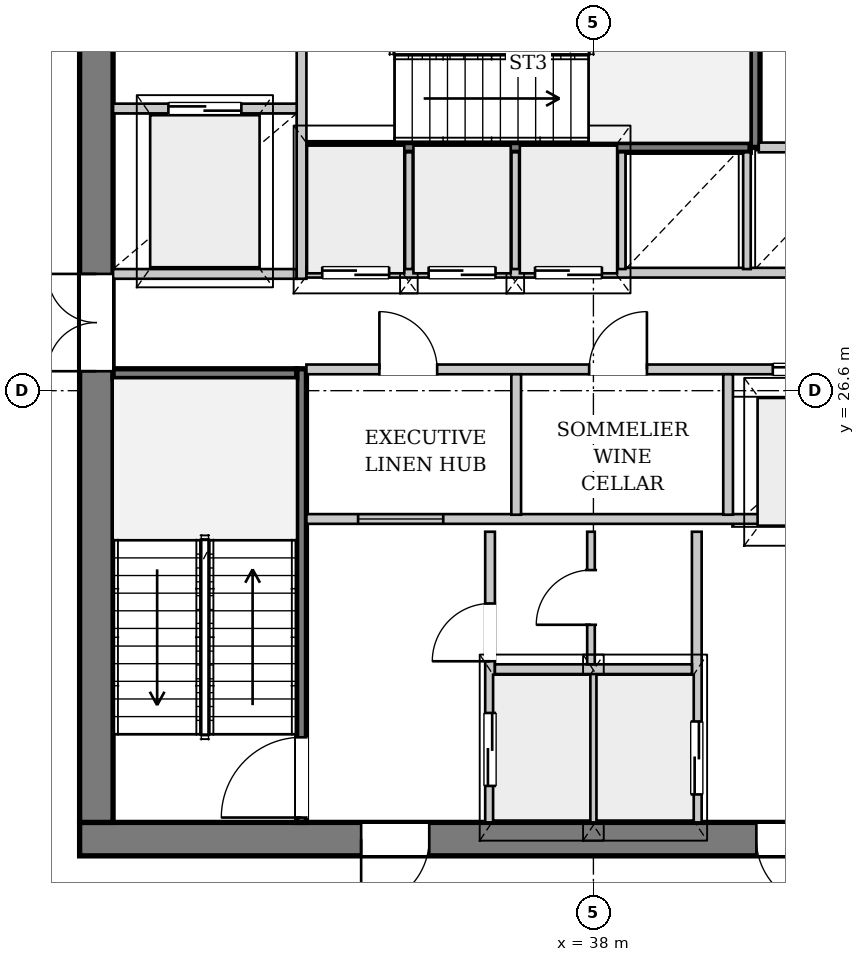
"""IFC4 building model, lengths in metres.
Left out: names, types, materials, properties, quantities, classifications, styles, units other than length and angle.
Written with IfcOpenShell. Run it as: python <this file> out.ifc"""

import sys

from ifc_helpers import new_model, si_unit, direction, frame, frame_2d, origin, place, context, subcontext, project, spatial, rectangle, extrude, source, transform, mapped, element, fill, save


model = new_model("IFC4")
c1 = context("Model", 3, precision=1e-05, world=origin(), true_north=direction((0.0, 1.0)))
c2 = subcontext(c1, "Body", "Model", "MODEL_VIEW")
j1 = project(units=[si_unit("LENGTHUNIT", "METRE"), si_unit("PLANEANGLEUNIT", "RADIAN")], contexts=[c1])
p1 = place(None, origin())
s1 = spatial("IfcSite", under=j1, at=p1, CompositionType="ELEMENT")
p2 = place(p1, origin())
s2 = spatial("IfcBuilding", under=s1, at=p2, CompositionType="ELEMENT")
p3 = place(p2, frame((0.0, 0.0, 200.3)))
s3 = spatial("IfcBuildingStorey", under=s2, at=p3, CompositionType="ELEMENT", Elevation=200.3)
p4 = place(p3, frame((46.45, 19.225, 0.0), z_axis=(0.0, 0.0, 1.0), x_axis=(-1.0, 0.0, 0.0)))
e1 = element("IfcWall", 1, at=p4, inside=s3, PredefinedType="SHEAR", context=c2, shape_type="SweptSolid", body=[
    extrude(rectangle(XDim=16.9, YDim=0.55, at=frame_2d((8.45, 0.0))), origin(), (0.0, 0.0, 1.0), 3.58),
])
p5 = place(p4, frame((4.65, 0.0, 0.0)))
e2 = element("IfcOpeningElement", 2, at=p5, cuts=e1, PredefinedType="OPENING", context=c2, shape_type="SweptSolid", body=[
    extrude(rectangle(XDim=1.12, YDim=2.25, at=frame_2d((0.56, 1.125))), frame((0.0, 0.285, 0.0), z_axis=(0.0, -1.0, 0.0), x_axis=(1.0, 0.0, 0.0)), (0.0, 0.0, 1.0), 0.57),
])
p6 = place(p4, frame((11.15, 0.0, 0.0)))
e3 = element("IfcOpeningElement", 3, at=p6, cuts=e1, PredefinedType="OPENING", context=c2, shape_type="SweptSolid", body=[
    extrude(rectangle(XDim=1.12, YDim=2.25, at=frame_2d((0.56, 1.125))), frame((0.0, 0.285, 0.0), z_axis=(0.0, -1.0, 0.0), x_axis=(1.0, 0.0, 0.0)), (0.0, 0.0, 1.0), 0.57),
])
p7 = place(p3, frame((29.825, 19.5, 0.0), z_axis=(0.0, 0.0, 1.0), x_axis=(0.0, 1.0, 0.0)))
e4 = element("IfcWall", 4, at=p7, inside=s3, PredefinedType="SHEAR", context=c2, shape_type="SweptSolid", body=[
    extrude(rectangle(XDim=14.2, YDim=0.55, at=frame_2d((7.1, 0.0))), origin(), (0.0, 0.0, 1.0), 3.58),
])
p8 = place(p7, frame((7.42, 0.0, 0.0)))
e5 = element("IfcOpeningElement", 5, at=p8, cuts=e4, PredefinedType="OPENING", context=c2, shape_type="SweptSolid", body=[
    extrude(rectangle(XDim=1.6, YDim=2.2, at=frame_2d((0.8, 1.1))), frame((0.0, 0.285, 0.0), z_axis=(0.0, -1.0, 0.0), x_axis=(1.0, 0.0, 0.0)), (0.0, 0.0, 1.0), 0.57),
])
p9 = place(p3, frame((33.2, 19.5, 0.0), z_axis=(0.0, 0.0, 1.0), x_axis=(0.0, 1.0, 0.0)))
e6 = element("IfcWall", 6, at=p9, inside=s3, PredefinedType="PARTITIONING", context=c2, shape_type="SweptSolid", body=[
    extrude(rectangle(XDim=7.46, YDim=0.16, at=frame_2d((3.73, 0.0))), origin(), (0.0, 0.0, 1.0), 3.58),
])
p10 = place(p9, frame((0.08, 0.0, 0.0)))
e7 = element("IfcOpeningElement", 7, at=p10, cuts=e6, PredefinedType="OPENING", context=c2, shape_type="SweptSolid", body=[
    extrude(rectangle(XDim=1.32, YDim=2.2, at=frame_2d((0.66, 1.1))), frame((0.0, 0.09, 0.0), z_axis=(0.0, -1.0, 0.0), x_axis=(1.0, 0.0, 0.0)), (0.0, 0.0, 1.0), 0.18),
])
p11 = place(p3, frame((30.1, 26.88, 0.0), z_axis=(0.0, 0.0, 1.0), x_axis=(1.0, 0.0, 0.0)))
e8 = element("IfcWall", 8, at=p11, inside=s3, PredefinedType="PARTITIONING", context=c2, shape_type="SweptSolid", body=[
    extrude(rectangle(XDim=3.02, YDim=0.16, at=frame_2d((1.51, 0.0))), origin(), (0.0, 0.0, 1.0), 3.58),
])
p12 = place(p3, frame((33.28, 30.6, 0.0), z_axis=(0.0, 0.0, 1.0), x_axis=(1.0, 0.0, 0.0)))
e9 = element("IfcWall", 9, at=p12, inside=s3, PredefinedType="PARTITIONING", context=c2, shape_type="SweptSolid", body=[
    extrude(rectangle(XDim=7.3, YDim=0.16, at=frame_2d((3.65, 0.0))), origin(), (0.0, 0.0, 1.0), 3.58),
])
p13 = place(p3, frame((40.66, 30.6, 0.0), z_axis=(0.0, 0.0, 1.0), x_axis=(0.0, 1.0, 0.0)))
e10 = element("IfcWall", 10, at=p13, inside=s3, PredefinedType="PARTITIONING", context=c2, shape_type="SweptSolid", body=[
    extrude(rectangle(XDim=3.1, YDim=0.16, at=frame_2d((1.55, 0.0))), origin(), (0.0, 0.0, 1.0), 3.58),
])
p14 = place(p3, frame((36.3, 19.5, 0.0), z_axis=(0.0, 0.0, 1.0), x_axis=(0.0, 1.0, 0.0)))
e11 = element("IfcWall", 11, at=p14, inside=s3, PredefinedType="PARTITIONING", context=c2, shape_type="SweptSolid", body=[
    extrude(rectangle(XDim=4.78, YDim=0.16, at=frame_2d((2.39, 0.0))), origin(), (0.0, 0.0, 1.0), 3.58),
])
p15 = place(p14, frame((0.6, 0.0, 0.0)))
e12 = element("IfcOpeningElement", 12, at=p15, cuts=e11, PredefinedType="OPENING", context=c2, shape_type="SweptSolid", body=[
    extrude(rectangle(XDim=1.2, YDim=2.2, at=frame_2d((0.6, 1.1))), frame((0.0, 0.09, 0.0), z_axis=(0.0, -1.0, 0.0), x_axis=(1.0, 0.0, 0.0)), (0.0, 0.0, 1.0), 0.18),
])
p16 = place(p14, frame((2.65, 0.0, 0.0)))
e13 = element("IfcOpeningElement", 13, at=p16, cuts=e11, PredefinedType="OPENING", context=c2, shape_type="SweptSolid", body=[
    extrude(rectangle(XDim=0.95, YDim=2.1, at=frame_2d((0.475, 1.05))), frame((0.0, 0.09, 0.0), z_axis=(0.0, -1.0, 0.0), x_axis=(1.0, 0.0, 0.0)), (0.0, 0.0, 1.0), 0.18),
])
p17 = place(p3, frame((39.7, 24.28, 0.0), z_axis=(0.0, 0.0, 1.0), x_axis=(0.0, -1.0, 0.0)))
e14 = element("IfcWall", 14, at=p17, inside=s3, PredefinedType="PARTITIONING", context=c2, shape_type="SweptSolid", body=[
    extrude(rectangle(XDim=4.78, YDim=0.16, at=frame_2d((2.39, 0.0))), origin(), (0.0, 0.0, 1.0), 3.58),
])
p18 = place(p17, frame((3.12, 0.0, 0.0)))
e15 = element("IfcOpeningElement", 15, at=p18, cuts=e14, PredefinedType="OPENING", context=c2, shape_type="SweptSolid", body=[
    extrude(rectangle(XDim=1.2, YDim=2.2, at=frame_2d((0.6, 1.1))), frame((0.0, 0.09, 0.0), z_axis=(0.0, -1.0, 0.0), x_axis=(1.0, 0.0, 0.0)), (0.0, 0.0, 1.0), 0.18),
])
p19 = place(p3, frame((38.0, 19.5, 0.0), z_axis=(0.0, 0.0, 1.0), x_axis=(0.0, 1.0, 0.0)))
e16 = element("IfcWall", 16, at=p19, inside=s3, PredefinedType="PARTITIONING", context=c2, shape_type="SweptSolid", body=[
    extrude(rectangle(XDim=2.46, YDim=0.125, at=frame_2d((1.23, 0.0))), origin(), (0.0, 0.0, 1.0), 3.58),
])
p20 = place(p3, frame((36.38, 22.02, 0.0), z_axis=(0.0, 0.0, 1.0), x_axis=(1.0, 0.0, 0.0)))
e17 = element("IfcWall", 17, at=p20, inside=s3, PredefinedType="PARTITIONING", context=c2, shape_type="SweptSolid", body=[
    extrude(rectangle(XDim=3.24, YDim=0.16, at=frame_2d((1.62, 0.0))), origin(), (0.0, 0.0, 1.0), 3.58),
])
p21 = place(p3, frame((33.28, 24.49, 0.0), z_axis=(0.0, 0.0, 1.0), x_axis=(1.0, 0.0, 0.0)))
e18 = element("IfcWall", 18, at=p21, inside=s3, PredefinedType="PARTITIONING", context=c2, shape_type="SweptSolid", body=[
    extrude(rectangle(XDim=9.44, YDim=0.16, at=frame_2d((4.72, 0.0))), origin(), (0.0, 0.0, 1.0), 3.58),
])
p22 = place(p21, frame((0.85, 0.0, 0.95)))
e19 = element("IfcOpeningElement", 19, at=p22, cuts=e18, PredefinedType="OPENING", context=c2, shape_type="SweptSolid", body=[
    extrude(rectangle(XDim=1.4, YDim=1.8, at=frame_2d((0.7, 0.9))), frame((0.0, 0.09, 0.0), z_axis=(0.0, -1.0, 0.0), x_axis=(1.0, 0.0, 0.0)), (0.0, 0.0, 1.0), 0.18),
])
p23 = place(p3, frame((37.96, 22.1, 0.0), z_axis=(0.0, 0.0, 1.0), x_axis=(0.0, 1.0, 0.0)))
e20 = element("IfcWall", 20, at=p23, inside=s3, PredefinedType="PARTITIONING", context=c2, shape_type="SweptSolid", body=[
    extrude(rectangle(XDim=2.18, YDim=0.125, at=frame_2d((1.09, 0.0))), origin(), (0.0, 0.0, 1.0), 3.58),
])
p24 = place(p23, frame((0.65, 0.0, 0.0)))
e21 = element("IfcOpeningElement", 21, at=p24, cuts=e20, PredefinedType="OPENING", context=c2, shape_type="SweptSolid", body=[
    extrude(rectangle(XDim=0.9, YDim=2.1, at=frame_2d((0.45, 1.05))), frame((0.0, 0.073, 0.0), z_axis=(0.0, -1.0, 0.0), x_axis=(1.0, 0.0, 0.0)), (0.0, 0.0, 1.0), 0.145),
])
p25 = place(p3, frame((30.1, 28.52, 0.0), z_axis=(0.0, 0.0, 1.0), x_axis=(1.0, 0.0, 0.0)))
e22 = element("IfcWall", 22, at=p25, inside=s3, PredefinedType="PARTITIONING", context=c2, shape_type="SweptSolid", body=[
    extrude(rectangle(XDim=3.02, YDim=0.16, at=frame_2d((1.51, 0.0))), origin(), (0.0, 0.0, 1.0), 3.58),
])
p26 = place(p3, frame((33.2, 28.44, 0.0), z_axis=(0.0, 0.0, 1.0), x_axis=(0.0, 1.0, 0.0)))
e23 = element("IfcWall", 23, at=p26, inside=s3, PredefinedType="PARTITIONING", context=c2, shape_type="SweptSolid", body=[
    extrude(rectangle(XDim=5.26, YDim=0.16, at=frame_2d((2.63, 0.0))), origin(), (0.0, 0.0, 1.0), 3.58),
])
p27 = place(p3, frame((30.1, 31.24, 0.0), z_axis=(0.0, 0.0, 1.0), x_axis=(1.0, 0.0, 0.0)))
e24 = element("IfcWall", 24, at=p27, inside=s3, PredefinedType="PARTITIONING", context=c2, shape_type="SweptSolid", body=[
    extrude(rectangle(XDim=3.02, YDim=0.16, at=frame_2d((1.51, 0.0))), origin(), (0.0, 0.0, 1.0), 3.58),
])
p28 = place(p27, frame((0.91, 0.0, 0.0)))
e25 = element("IfcOpeningElement", 25, at=p28, cuts=e24, PredefinedType="OPENING", context=c2, shape_type="SweptSolid", body=[
    extrude(rectangle(XDim=1.2, YDim=2.2, at=frame_2d((0.6, 1.1))), frame((0.0, 0.09, 0.0), z_axis=(0.0, -1.0, 0.0), x_axis=(1.0, 0.0, 0.0)), (0.0, 0.0, 1.0), 0.18),
])
p29 = place(p3, frame((33.28, 26.95, 0.0), z_axis=(0.0, 0.0, 1.0), x_axis=(1.0, 0.0, 0.0)))
e26 = element("IfcWall", 26, at=p29, inside=s3, PredefinedType="PARTITIONING", context=c2, shape_type="SweptSolid", body=[
    extrude(rectangle(XDim=9.44, YDim=0.16, at=frame_2d((4.72, 0.0))), origin(), (0.0, 0.0, 1.0), 3.58),
])
p30 = place(p29, frame((1.2, 0.0, 0.0)))
e27 = element("IfcOpeningElement", 27, at=p30, cuts=e26, PredefinedType="OPENING", context=c2, shape_type="SweptSolid", body=[
    extrude(rectangle(XDim=0.95, YDim=2.1, at=frame_2d((0.475, 1.05))), frame((0.0, 0.09, 0.0), z_axis=(0.0, -1.0, 0.0), x_axis=(1.0, 0.0, 0.0)), (0.0, 0.0, 1.0), 0.18),
])
p31 = place(p29, frame((4.65, 0.0, 0.0)))
e28 = element("IfcOpeningElement", 28, at=p31, cuts=e26, PredefinedType="OPENING", context=c2, shape_type="SweptSolid", body=[
    extrude(rectangle(XDim=0.95, YDim=2.1, at=frame_2d((0.475, 1.05))), frame((0.0, 0.09, 0.0), z_axis=(0.0, -1.0, 0.0), x_axis=(1.0, 0.0, 0.0)), (0.0, 0.0, 1.0), 0.18),
])
p32 = place(p29, frame((7.67, 0.0, 0.0)))
e29 = element("IfcOpeningElement", 29, at=p32, cuts=e26, PredefinedType="OPENING", context=c2, shape_type="SweptSolid", body=[
    extrude(rectangle(XDim=1.1, YDim=2.2, at=frame_2d((0.55, 1.1))), frame((0.0, 0.09, 0.0), z_axis=(0.0, -1.0, 0.0), x_axis=(1.0, 0.0, 0.0)), (0.0, 0.0, 1.0), 0.18),
])
for number, where, z_axis, x_axis in (
    (30, (36.73, 24.56, 0.0), (0.0, 0.0, 1.0), (0.0, 1.0, 0.0)),
    (31, (40.215, 24.56, 0.0), (0.0, 0.0, 1.0), (0.0, 1.0, 0.0)),
):
    element("IfcWall", number, at=place(p3, frame(where, z_axis=z_axis, x_axis=x_axis)), inside=s3, PredefinedType="PARTITIONING", context=c2, shape_type="SweptSolid", body=[
        extrude(rectangle(XDim=2.31, YDim=0.16, at=frame_2d((1.155, 0.0))), origin(), (0.0, 0.0, 1.0), 3.58),
    ])
p33 = place(p3, frame((33.28, 28.54, 0.0), z_axis=(0.0, 0.0, 1.0), x_axis=(1.0, 0.0, 0.0)))
e32 = element("IfcWall", 32, at=p33, inside=s3, PredefinedType="PARTITIONING", context=c2, shape_type="SweptSolid", body=[
    extrude(rectangle(XDim=12.62, YDim=0.16, at=frame_2d((6.31, 0.0))), origin(), (0.0, 0.0, 1.0), 3.58),
])
p34 = place(p33, frame((0.26, 0.0, 0.0)))
e33 = element("IfcOpeningElement", 33, at=p34, cuts=e32, PredefinedType="OPENING", context=c2, shape_type="SweptSolid", body=[
    extrude(rectangle(XDim=1.1, YDim=2.2, at=frame_2d((0.55, 1.1))), frame((0.0, 0.09, 0.0), z_axis=(0.0, -1.0, 0.0), x_axis=(1.0, 0.0, 0.0)), (0.0, 0.0, 1.0), 0.18),
])
p35 = place(p33, frame((2.01, 0.0, 0.0)))
e34 = element("IfcOpeningElement", 34, at=p35, cuts=e32, PredefinedType="OPENING", context=c2, shape_type="SweptSolid", body=[
    extrude(rectangle(XDim=1.1, YDim=2.2, at=frame_2d((0.55, 1.1))), frame((0.0, 0.09, 0.0), z_axis=(0.0, -1.0, 0.0), x_axis=(1.0, 0.0, 0.0)), (0.0, 0.0, 1.0), 0.18),
])
p36 = place(p33, frame((3.76, 0.0, 0.0)))
e35 = element("IfcOpeningElement", 35, at=p36, cuts=e32, PredefinedType="OPENING", context=c2, shape_type="SweptSolid", body=[
    extrude(rectangle(XDim=1.1, YDim=2.2, at=frame_2d((0.55, 1.1))), frame((0.0, 0.09, 0.0), z_axis=(0.0, -1.0, 0.0), x_axis=(1.0, 0.0, 0.0)), (0.0, 0.0, 1.0), 0.18),
])
p37 = place(p3, frame((40.72, 30.6, 0.0), z_axis=(0.0, 0.0, 1.0), x_axis=(1.0, 0.0, 0.0)))
e36 = element("IfcWall", 36, at=p37, inside=s3, PredefinedType="PARTITIONING", context=c2, shape_type="SweptSolid", body=[
    extrude(rectangle(XDim=5.18, YDim=0.16, at=frame_2d((2.59, 0.0))), origin(), (0.0, 0.0, 1.0), 3.58),
])
for number, where, z_axis, x_axis in (
    (37, (34.965, 28.6, 0.0), (0.0, 0.0, 1.0), (0.0, 1.0, 0.0)),
    (38, (36.715, 28.6, 0.0), (0.0, 0.0, 1.0), (0.0, 1.0, 0.0)),
    (39, (38.465, 28.6, 0.0), (0.0, 0.0, 1.0), (0.0, 1.0, 0.0)),
    (40, (40.525, 28.6, 0.0), (0.0, 0.0, 1.0), (0.0, 1.0, 0.0)),
):
    element("IfcWall", number, at=place(p3, frame(where, z_axis=z_axis, x_axis=x_axis)), inside=s3, PredefinedType="PARTITIONING", context=c2, shape_type="SweptSolid", body=[
        extrude(rectangle(XDim=1.92, YDim=0.125, at=frame_2d((0.96, 0.0))), origin(), (0.0, 0.0, 1.0), 3.58),
    ])
m1 = source(origin(), c2, "Body", "SweptSolid", [
    extrude(rectangle(XDim=1.12, YDim=2.25, at=frame_2d((0.56, 1.125))), frame((0.0, 0.025, 0.0), z_axis=(0.0, -1.0, 0.0), x_axis=(1.0, 0.0, 0.0)), (0.0, 0.0, 1.0), 0.05),
])
p38 = place(p5, origin())
e41 = element("IfcDoor", 41, at=p38, inside=s3, OperationType="SINGLE_SWING_LEFT", PredefinedType="DOOR", context=c2, shape_type="MappedRepresentation", body=[
    mapped(m1, transform((0.0, 0.0, 0.0), x_axis=(1.0, 0.0, 0.0), y_axis=(0.0, 1.0, 0.0), z_axis=(0.0, 0.0, 1.0), scale=1.0)),
])
fill(e2, e41)
p39 = place(p6, origin())
e42 = element("IfcDoor", 42, at=p39, inside=s3, OperationType="SINGLE_SWING_RIGHT", PredefinedType="DOOR", context=c2, shape_type="MappedRepresentation", body=[
    mapped(m1, transform((0.0, 0.0, 0.0), x_axis=(1.0, 0.0, 0.0), y_axis=(0.0, 1.0, 0.0), z_axis=(0.0, 0.0, 1.0), scale=1.0)),
])
fill(e3, e42)
m2 = source(origin(), c2, "Body", "SweptSolid", [
    extrude(rectangle(XDim=1.6, YDim=2.2, at=frame_2d((0.8, 1.1))), frame((0.0, 0.025, 0.0), z_axis=(0.0, -1.0, 0.0), x_axis=(1.0, 0.0, 0.0)), (0.0, 0.0, 1.0), 0.05),
])
p40 = place(p8, origin())
e43 = element("IfcDoor", 43, at=p40, inside=s3, OperationType="DOUBLE_DOOR_SINGLE_SWING", PredefinedType="DOOR", context=c2, shape_type="MappedRepresentation", body=[
    mapped(m2, transform((0.0, 0.0, 0.0), x_axis=(1.0, 0.0, 0.0), y_axis=(0.0, 1.0, 0.0), z_axis=(0.0, 0.0, 1.0), scale=1.0)),
])
fill(e5, e43)
m3 = source(origin(), c2, "Body", "SweptSolid", [
    extrude(rectangle(XDim=1.32, YDim=2.2, at=frame_2d((0.66, 1.1))), frame((0.0, 0.025, 0.0), z_axis=(0.0, -1.0, 0.0), x_axis=(1.0, 0.0, 0.0)), (0.0, 0.0, 1.0), 0.05),
])
p41 = place(p10, origin())
e44 = element("IfcDoor", 44, at=p41, inside=s3, OperationType="SINGLE_SWING_LEFT", PredefinedType="DOOR", context=c2, shape_type="MappedRepresentation", body=[
    mapped(m3, transform((0.0, 0.0, 0.0), x_axis=(1.0, 0.0, 0.0), y_axis=(0.0, 1.0, 0.0), z_axis=(0.0, 0.0, 1.0), scale=1.0)),
])
fill(e7, e44)
m4 = source(origin(), c2, "Body", "SweptSolid", [
    extrude(rectangle(XDim=1.2, YDim=2.2, at=frame_2d((0.6, 1.1))), frame((0.0, 0.025, 0.0), z_axis=(0.0, -1.0, 0.0), x_axis=(1.0, 0.0, 0.0)), (0.0, 0.0, 1.0), 0.05),
])
p42 = place(p15, origin())
e45 = element("IfcDoor", 45, at=p42, inside=s3, OperationType="DOUBLE_DOOR_SLIDING", PredefinedType="DOOR", context=c2, shape_type="MappedRepresentation", body=[
    mapped(m4, transform((0.0, 0.0, 0.0), x_axis=(1.0, 0.0, 0.0), y_axis=(0.0, 1.0, 0.0), z_axis=(0.0, 0.0, 1.0), scale=1.0)),
])
fill(e12, e45)
m5 = source(origin(), c2, "Body", "SweptSolid", [
    extrude(rectangle(XDim=0.95, YDim=2.1, at=frame_2d((0.475, 1.05))), frame((0.0, 0.025, 0.0), z_axis=(0.0, -1.0, 0.0), x_axis=(1.0, 0.0, 0.0)), (0.0, 0.0, 1.0), 0.05),
])
p43 = place(p16, origin())
e46 = element("IfcDoor", 46, at=p43, inside=s3, OperationType="SINGLE_SWING_LEFT", PredefinedType="DOOR", context=c2, shape_type="MappedRepresentation", body=[
    mapped(m5, transform((0.0, 0.0, 0.0), x_axis=(1.0, 0.0, 0.0), y_axis=(0.0, 1.0, 0.0), z_axis=(0.0, 0.0, 1.0), scale=1.0)),
])
fill(e13, e46)
m6 = source(origin(), c2, "Body", "SweptSolid", [
    extrude(rectangle(XDim=0.9, YDim=2.1, at=frame_2d((0.45, 1.05))), frame((0.0, 0.025, 0.0), z_axis=(0.0, -1.0, 0.0), x_axis=(1.0, 0.0, 0.0)), (0.0, 0.0, 1.0), 0.05),
])
p44 = place(p24, origin())
e47 = element("IfcDoor", 47, at=p44, inside=s3, OperationType="SINGLE_SWING_LEFT", PredefinedType="DOOR", context=c2, shape_type="MappedRepresentation", body=[
    mapped(m6, transform((0.0, 0.0, 0.0), x_axis=(1.0, 0.0, 0.0), y_axis=(0.0, 1.0, 0.0), z_axis=(0.0, 0.0, 1.0), scale=1.0)),
])
fill(e21, e47)
p45 = place(p18, origin())
e48 = element("IfcDoor", 48, at=p45, inside=s3, OperationType="DOUBLE_DOOR_SLIDING", PredefinedType="DOOR", context=c2, shape_type="MappedRepresentation", body=[
    mapped(m4, transform((0.0, 0.0, 0.0), x_axis=(1.0, 0.0, 0.0), y_axis=(0.0, 1.0, 0.0), z_axis=(0.0, 0.0, 1.0), scale=1.0)),
])
fill(e15, e48)
p46 = place(p28, origin())
e49 = element("IfcDoor", 49, at=p46, inside=s3, OperationType="DOUBLE_DOOR_SLIDING", PredefinedType="DOOR", context=c2, shape_type="MappedRepresentation", body=[
    mapped(m4, transform((0.0, 0.0, 0.0), x_axis=(1.0, 0.0, 0.0), y_axis=(0.0, 1.0, 0.0), z_axis=(0.0, 0.0, 1.0), scale=1.0)),
])
fill(e25, e49)
p47 = place(p30, origin())
e50 = element("IfcDoor", 50, at=p47, inside=s3, OperationType="SINGLE_SWING_LEFT", PredefinedType="DOOR", context=c2, shape_type="MappedRepresentation", body=[
    mapped(m5, transform((0.0, 0.0, 0.0), x_axis=(1.0, 0.0, 0.0), y_axis=(0.0, 1.0, 0.0), z_axis=(0.0, 0.0, 1.0), scale=1.0)),
])
fill(e27, e50)
p48 = place(p31, origin())
e51 = element("IfcDoor", 51, at=p48, inside=s3, OperationType="SINGLE_SWING_RIGHT", PredefinedType="DOOR", context=c2, shape_type="MappedRepresentation", body=[
    mapped(m5, transform((0.0, 0.0, 0.0), x_axis=(1.0, 0.0, 0.0), y_axis=(0.0, 1.0, 0.0), z_axis=(0.0, 0.0, 1.0), scale=1.0)),
])
fill(e28, e51)
m7 = source(origin(), c2, "Body", "SweptSolid", [
    extrude(rectangle(XDim=1.1, YDim=2.2, at=frame_2d((0.55, 1.1))), frame((0.0, 0.025, 0.0), z_axis=(0.0, -1.0, 0.0), x_axis=(1.0, 0.0, 0.0)), (0.0, 0.0, 1.0), 0.05),
])
p49 = place(p32, origin())
e52 = element("IfcDoor", 52, at=p49, inside=s3, OperationType="DOUBLE_DOOR_SLIDING", PredefinedType="DOOR", context=c2, shape_type="MappedRepresentation", body=[
    mapped(m7, transform((0.0, 0.0, 0.0), x_axis=(1.0, 0.0, 0.0), y_axis=(0.0, 1.0, 0.0), z_axis=(0.0, 0.0, 1.0), scale=1.0)),
])
fill(e29, e52)
p50 = place(p34, origin())
e53 = element("IfcDoor", 53, at=p50, inside=s3, OperationType="DOUBLE_DOOR_SLIDING", PredefinedType="DOOR", context=c2, shape_type="MappedRepresentation", body=[
    mapped(m7, transform((0.0, 0.0, 0.0), x_axis=(1.0, 0.0, 0.0), y_axis=(0.0, 1.0, 0.0), z_axis=(0.0, 0.0, 1.0), scale=1.0)),
])
fill(e33, e53)
p51 = place(p35, origin())
e54 = element("IfcDoor", 54, at=p51, inside=s3, OperationType="DOUBLE_DOOR_SLIDING", PredefinedType="DOOR", context=c2, shape_type="MappedRepresentation", body=[
    mapped(m7, transform((0.0, 0.0, 0.0), x_axis=(1.0, 0.0, 0.0), y_axis=(0.0, 1.0, 0.0), z_axis=(0.0, 0.0, 1.0), scale=1.0)),
])
fill(e34, e54)
p52 = place(p36, origin())
e55 = element("IfcDoor", 55, at=p52, inside=s3, OperationType="DOUBLE_DOOR_SLIDING", PredefinedType="DOOR", context=c2, shape_type="MappedRepresentation", body=[
    mapped(m7, transform((0.0, 0.0, 0.0), x_axis=(1.0, 0.0, 0.0), y_axis=(0.0, 1.0, 0.0), z_axis=(0.0, 0.0, 1.0), scale=1.0)),
])
fill(e35, e55)
m8 = source(origin(), c2, "Body", "SweptSolid", [
    extrude(rectangle(XDim=1.4, YDim=1.8, at=frame_2d((0.7, 0.9))), frame((0.0, 0.03, 0.0), z_axis=(0.0, -1.0, 0.0), x_axis=(1.0, 0.0, 0.0)), (0.0, 0.0, 1.0), 0.06),
])
p53 = place(p22, origin())
e56 = element("IfcWindow", 56, at=p53, inside=s3, PartitioningType="SINGLE_PANEL", PredefinedType="WINDOW", context=c2, shape_type="MappedRepresentation", body=[
    mapped(m8, transform((0.0, 0.0, 0.0), x_axis=(1.0, 0.0, 0.0), y_axis=(0.0, 1.0, 0.0), z_axis=(0.0, 0.0, 1.0), scale=1.0)),
])
fill(e19, e56)
save(model, sys.argv[1])
